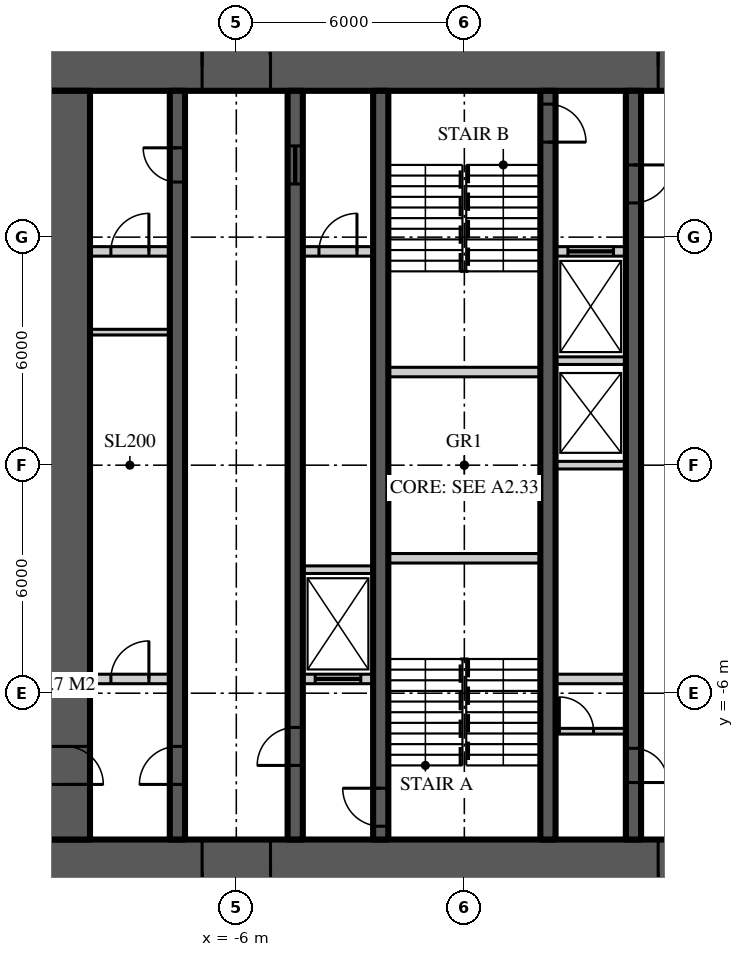
"""IFC4 building model, lengths in metres.
Left out: names, types, materials, properties, quantities, classifications, styles, units other than length and angle.
Written with IfcOpenShell. Run it as: python <this file> out.ifc"""

import sys

from ifc_helpers import new_model, si_unit, direction, frame, frame_2d, origin, place, context, subcontext, project, spatial, rectangle, extrude, element, fill, save


model = new_model("IFC4")
c1 = context("Model", 3, precision=1e-05, world=origin(), true_north=direction((0.0, 1.0)))
c2 = subcontext(c1, "Body", "Model", "MODEL_VIEW")
j1 = project(units=[si_unit("LENGTHUNIT", "METRE"), si_unit("PLANEANGLEUNIT", "RADIAN")], contexts=[c1])
p1 = place(None, origin())
s1 = spatial("IfcSite", under=j1, at=p1, CompositionType="ELEMENT")
p2 = place(p1, origin())
s2 = spatial("IfcBuilding", under=s1, at=p2, CompositionType="ELEMENT")
p3 = place(p2, frame((0.0, 0.0, 255.6)))
s3 = spatial("IfcBuildingStorey", under=s2, at=p3, CompositionType="ELEMENT", Elevation=255.6)
p4 = place(p3, frame((-11.15, 10.5, 0.0), z_axis=(0.0, 0.0, 1.0), x_axis=(1.0, 0.0, 0.0)))
e1 = element("IfcWall", 1, at=p4, inside=s3, PredefinedType="SHEAR", context=c2, shape_type="SweptSolid", body=[
    extrude(rectangle(XDim=22.3, YDim=1.3, at=frame_2d((11.15, 0.0))), origin(), (0.0, 0.0, 1.0), 3.9),
])
p5 = place(p4, frame((4.25, 0.0, 0.0)))
e2 = element("IfcOpeningElement", 2, at=p5, cuts=e1, PredefinedType="OPENING", context=c2, shape_type="SweptSolid", body=[
    extrude(rectangle(XDim=1.8, YDim=2.2, at=frame_2d((0.9, 1.1))), frame((0.0, 0.66, 0.0), z_axis=(0.0, -1.0, 0.0), x_axis=(1.0, 0.0, 0.0)), (0.0, 0.0, 1.0), 1.32),
])
p6 = place(p4, frame((16.25, 0.0, 0.0)))
e3 = element("IfcOpeningElement", 3, at=p6, cuts=e1, PredefinedType="OPENING", context=c2, shape_type="SweptSolid", body=[
    extrude(rectangle(XDim=1.8, YDim=2.2, at=frame_2d((0.9, 1.1))), frame((0.0, 0.66, 0.0), z_axis=(0.0, -1.0, 0.0), x_axis=(1.0, 0.0, 0.0)), (0.0, 0.0, 1.0), 1.32),
])
p7 = place(p3, frame((11.15, -10.5, 0.0), z_axis=(0.0, 0.0, 1.0), x_axis=(-1.0, 0.0, 0.0)))
e4 = element("IfcWall", 4, at=p7, inside=s3, PredefinedType="SHEAR", context=c2, shape_type="SweptSolid", body=[
    extrude(rectangle(XDim=22.3, YDim=1.3, at=frame_2d((11.15, 0.0))), origin(), (0.0, 0.0, 1.0), 3.9),
])
p8 = place(p7, frame((16.25, 0.0, 0.0)))
e5 = element("IfcOpeningElement", 5, at=p8, cuts=e4, PredefinedType="OPENING", context=c2, shape_type="SweptSolid", body=[
    extrude(rectangle(XDim=1.8, YDim=2.2, at=frame_2d((0.9, 1.1))), frame((0.0, 0.66, 0.0), z_axis=(0.0, -1.0, 0.0), x_axis=(1.0, 0.0, 0.0)), (0.0, 0.0, 1.0), 1.32),
])
p9 = place(p7, frame((4.25, 0.0, 0.0)))
e6 = element("IfcOpeningElement", 6, at=p9, cuts=e4, PredefinedType="OPENING", context=c2, shape_type="SweptSolid", body=[
    extrude(rectangle(XDim=1.8, YDim=2.2, at=frame_2d((0.9, 1.1))), frame((0.0, 0.66, 0.0), z_axis=(0.0, -1.0, 0.0), x_axis=(1.0, 0.0, 0.0)), (0.0, 0.0, 1.0), 1.32),
])
p10 = place(p3, frame((-10.5, 9.85, 0.0), z_axis=(0.0, 0.0, 1.0), x_axis=(0.0, -1.0, 0.0)))
e7 = element("IfcWall", 7, at=p10, inside=s3, PredefinedType="SHEAR", context=c2, shape_type="SweptSolid", body=[
    extrude(rectangle(XDim=19.7, YDim=1.3, at=frame_2d((9.85, 0.0))), origin(), (0.0, 0.0, 1.0), 3.9),
])
p11 = place(p10, frame((17.25, 0.0, 0.0)))
e8 = element("IfcOpeningElement", 8, at=p11, cuts=e7, PredefinedType="OPENING", context=c2, shape_type="SweptSolid", body=[
    extrude(rectangle(XDim=1.0, YDim=2.2, at=frame_2d((0.5, 1.1))), frame((0.0, 0.66, 0.0), z_axis=(0.0, -1.0, 0.0), x_axis=(1.0, 0.0, 0.0)), (0.0, 0.0, 1.0), 1.32),
])
p12 = place(p3, frame((-7.55, -9.85, 0.0), z_axis=(0.0, 0.0, 1.0), x_axis=(0.0, 1.0, 0.0)))
e9 = element("IfcWall", 9, at=p12, inside=s3, PredefinedType="SHEAR", context=c2, shape_type="SweptSolid", body=[
    extrude(rectangle(XDim=19.7, YDim=0.4, at=frame_2d((9.85, 0.0))), origin(), (0.0, 0.0, 1.0), 3.9),
])
p13 = place(p12, frame((1.45, 0.0, 0.0)))
e10 = element("IfcOpeningElement", 10, at=p13, cuts=e9, PredefinedType="OPENING", context=c2, shape_type="SweptSolid", body=[
    extrude(rectangle(XDim=1.0, YDim=2.2, at=frame_2d((0.5, 1.1))), frame((0.0, 0.21, 0.0), z_axis=(0.0, -1.0, 0.0), x_axis=(1.0, 0.0, 0.0)), (0.0, 0.0, 1.0), 0.42),
])
p14 = place(p12, frame((17.3, 0.0, 0.0)))
e11 = element("IfcOpeningElement", 11, at=p14, cuts=e9, PredefinedType="OPENING", context=c2, shape_type="SweptSolid", body=[
    extrude(rectangle(XDim=0.9, YDim=2.1, at=frame_2d((0.45, 1.05))), frame((0.0, 0.21, 0.0), z_axis=(0.0, -1.0, 0.0), x_axis=(1.0, 0.0, 0.0)), (0.0, 0.0, 1.0), 0.42),
])
p15 = place(p3, frame((-4.45, -9.85, 0.0), z_axis=(0.0, 0.0, 1.0), x_axis=(0.0, 1.0, 0.0)))
e12 = element("IfcWall", 12, at=p15, inside=s3, PredefinedType="SHEAR", context=c2, shape_type="SweptSolid", body=[
    extrude(rectangle(XDim=19.7, YDim=0.4, at=frame_2d((9.85, 0.0))), origin(), (0.0, 0.0, 1.0), 3.9),
])
p16 = place(p15, frame((1.95, 0.0, 0.0)))
e13 = element("IfcOpeningElement", 13, at=p16, cuts=e12, PredefinedType="OPENING", context=c2, shape_type="SweptSolid", body=[
    extrude(rectangle(XDim=1.0, YDim=2.2, at=frame_2d((0.5, 1.1))), frame((0.0, 0.21, 0.0), z_axis=(0.0, -1.0, 0.0), x_axis=(1.0, 0.0, 0.0)), (0.0, 0.0, 1.0), 0.42),
])
p17 = place(p15, frame((17.25, 0.0, 0.0)))
e14 = element("IfcOpeningElement", 14, at=p17, cuts=e12, PredefinedType="OPENING", context=c2, shape_type="SweptSolid", body=[
    extrude(rectangle(XDim=1.0, YDim=2.1, at=frame_2d((0.5, 1.05))), frame((0.0, 0.21, 0.0), z_axis=(0.0, -1.0, 0.0), x_axis=(1.0, 0.0, 0.0)), (0.0, 0.0, 1.0), 0.42),
])
p18 = place(p3, frame((4.45, 9.85, 0.0), z_axis=(0.0, 0.0, 1.0), x_axis=(0.0, -1.0, 0.0)))
e15 = element("IfcWall", 15, at=p18, inside=s3, PredefinedType="SHEAR", context=c2, shape_type="SweptSolid", body=[
    extrude(rectangle(XDim=19.7, YDim=0.4, at=frame_2d((9.85, 0.0))), origin(), (0.0, 0.0, 1.0), 3.9),
])
p19 = place(p18, frame((1.95, 0.0, 0.0)))
e16 = element("IfcOpeningElement", 16, at=p19, cuts=e15, PredefinedType="OPENING", context=c2, shape_type="SweptSolid", body=[
    extrude(rectangle(XDim=1.0, YDim=2.2, at=frame_2d((0.5, 1.1))), frame((0.0, 0.21, 0.0), z_axis=(0.0, -1.0, 0.0), x_axis=(1.0, 0.0, 0.0)), (0.0, 0.0, 1.0), 0.42),
])
p20 = place(p18, frame((17.3, 0.0, 0.0)))
e17 = element("IfcOpeningElement", 17, at=p20, cuts=e15, PredefinedType="OPENING", context=c2, shape_type="SweptSolid", body=[
    extrude(rectangle(XDim=0.9, YDim=2.1, at=frame_2d((0.45, 1.05))), frame((0.0, 0.21, 0.0), z_axis=(0.0, -1.0, 0.0), x_axis=(1.0, 0.0, 0.0)), (0.0, 0.0, 1.0), 0.42),
])
p21 = place(p3, frame((-2.2, -9.85, 0.0), z_axis=(0.0, 0.0, 1.0), x_axis=(0.0, 1.0, 0.0)))
e18 = element("IfcWall", 18, at=p21, inside=s3, PredefinedType="SHEAR", context=c2, shape_type="SweptSolid", body=[
    extrude(rectangle(XDim=19.7, YDim=0.4, at=frame_2d((9.85, 0.0))), origin(), (0.0, 0.0, 1.0), 3.9),
])
p22 = place(p21, frame((0.35, 0.0, 0.0)))
e19 = element("IfcOpeningElement", 19, at=p22, cuts=e18, PredefinedType="OPENING", context=c2, shape_type="SweptSolid", body=[
    extrude(rectangle(XDim=1.0, YDim=2.2, at=frame_2d((0.5, 1.1))), frame((0.0, 0.21, 0.0), z_axis=(0.0, -1.0, 0.0), x_axis=(1.0, 0.0, 0.0)), (0.0, 0.0, 1.0), 0.42),
])
p23 = place(p3, frame((2.2, 9.85, 0.0), z_axis=(0.0, 0.0, 1.0), x_axis=(0.0, -1.0, 0.0)))
e20 = element("IfcWall", 20, at=p23, inside=s3, PredefinedType="SHEAR", context=c2, shape_type="SweptSolid", body=[
    extrude(rectangle(XDim=19.7, YDim=0.4, at=frame_2d((9.85, 0.0))), origin(), (0.0, 0.0, 1.0), 3.9),
])
p24 = place(p23, frame((0.35, 0.0, 0.0)))
e21 = element("IfcOpeningElement", 21, at=p24, cuts=e20, PredefinedType="OPENING", context=c2, shape_type="SweptSolid", body=[
    extrude(rectangle(XDim=1.0, YDim=2.2, at=frame_2d((0.5, 1.1))), frame((0.0, 0.21, 0.0), z_axis=(0.0, -1.0, 0.0), x_axis=(1.0, 0.0, 0.0)), (0.0, 0.0, 1.0), 0.42),
])
p25 = place(p3, frame((-9.85, 5.625, 0.0), z_axis=(0.0, 0.0, 1.0), x_axis=(1.0, 0.0, 0.0)))
e22 = element("IfcWall", 22, at=p25, inside=s3, PredefinedType="SOLIDWALL", context=c2, shape_type="SweptSolid", body=[
    extrude(rectangle(XDim=2.1, YDim=0.25, at=frame_2d((1.05, 0.0))), origin(), (0.0, 0.0, 1.0), 3.7),
])
p26 = place(p25, frame((0.55, 0.0, 0.0)))
e23 = element("IfcOpeningElement", 23, at=p26, cuts=e22, PredefinedType="OPENING", context=c2, shape_type="SweptSolid", body=[
    extrude(rectangle(XDim=1.0, YDim=2.2, at=frame_2d((0.5, 1.1))), frame((0.0, 0.135, 0.0), z_axis=(0.0, -1.0, 0.0), x_axis=(1.0, 0.0, 0.0)), (0.0, 0.0, 1.0), 0.27),
])
p27 = place(p3, frame((-4.25, 5.625, 0.0), z_axis=(0.0, 0.0, 1.0), x_axis=(1.0, 0.0, 0.0)))
e24 = element("IfcWall", 24, at=p27, inside=s3, PredefinedType="SOLIDWALL", context=c2, shape_type="SweptSolid", body=[
    extrude(rectangle(XDim=1.85, YDim=0.25, at=frame_2d((0.925, 0.0))), origin(), (0.0, 0.0, 1.0), 3.7),
])
p28 = place(p27, frame((0.425, 0.0, 0.0)))
e25 = element("IfcOpeningElement", 25, at=p28, cuts=e24, PredefinedType="OPENING", context=c2, shape_type="SweptSolid", body=[
    extrude(rectangle(XDim=1.0, YDim=2.2, at=frame_2d((0.5, 1.1))), frame((0.0, 0.135, 0.0), z_axis=(0.0, -1.0, 0.0), x_axis=(1.0, 0.0, 0.0)), (0.0, 0.0, 1.0), 0.27),
])
p29 = place(p3, frame((2.4, 5.625, 0.0), z_axis=(0.0, 0.0, 1.0), x_axis=(1.0, 0.0, 0.0)))
e26 = element("IfcWall", 26, at=p29, inside=s3, PredefinedType="SOLIDWALL", context=c2, shape_type="SweptSolid", body=[
    extrude(rectangle(XDim=1.85, YDim=0.25, at=frame_2d((0.925, 0.0))), origin(), (0.0, 0.0, 1.0), 3.7),
])
p30 = place(p29, frame((0.325, 0.0, 0.0)))
e27 = element("IfcOpeningElement", 27, at=p30, cuts=e26, PredefinedType="OPENING", context=c2, shape_type="SweptSolid", body=[
    extrude(rectangle(XDim=1.2, YDim=2.2, at=frame_2d((0.6, 1.1))), frame((0.0, 0.135, 0.0), z_axis=(0.0, -1.0, 0.0), x_axis=(1.0, 0.0, 0.0)), (0.0, 0.0, 1.0), 0.27),
])
p31 = place(p3, frame((-9.85, -5.625, 0.0), z_axis=(0.0, 0.0, 1.0), x_axis=(1.0, 0.0, 0.0)))
e28 = element("IfcWall", 28, at=p31, inside=s3, PredefinedType="SOLIDWALL", context=c2, shape_type="SweptSolid", body=[
    extrude(rectangle(XDim=2.1, YDim=0.25, at=frame_2d((1.05, 0.0))), origin(), (0.0, 0.0, 1.0), 3.7),
])
p32 = place(p31, frame((0.55, 0.0, 0.0)))
e29 = element("IfcOpeningElement", 29, at=p32, cuts=e28, PredefinedType="OPENING", context=c2, shape_type="SweptSolid", body=[
    extrude(rectangle(XDim=1.0, YDim=2.2, at=frame_2d((0.5, 1.1))), frame((0.0, 0.135, 0.0), z_axis=(0.0, -1.0, 0.0), x_axis=(1.0, 0.0, 0.0)), (0.0, 0.0, 1.0), 0.27),
])
p33 = place(p3, frame((-4.25, -5.625, 0.0), z_axis=(0.0, 0.0, 1.0), x_axis=(1.0, 0.0, 0.0)))
e30 = element("IfcWall", 30, at=p33, inside=s3, PredefinedType="SOLIDWALL", context=c2, shape_type="SweptSolid", body=[
    extrude(rectangle(XDim=1.85, YDim=0.25, at=frame_2d((0.925, 0.0))), origin(), (0.0, 0.0, 1.0), 3.7),
])
p34 = place(p33, frame((0.325, 0.0, 0.0)))
e31 = element("IfcOpeningElement", 31, at=p34, cuts=e30, PredefinedType="OPENING", context=c2, shape_type="SweptSolid", body=[
    extrude(rectangle(XDim=1.2, YDim=2.2, at=frame_2d((0.6, 1.1))), frame((0.0, 0.135, 0.0), z_axis=(0.0, -1.0, 0.0), x_axis=(1.0, 0.0, 0.0)), (0.0, 0.0, 1.0), 0.27),
])
p35 = place(p3, frame((2.4, -5.625, 0.0), z_axis=(0.0, 0.0, 1.0), x_axis=(1.0, 0.0, 0.0)))
e32 = element("IfcWall", 32, at=p35, inside=s3, PredefinedType="SOLIDWALL", context=c2, shape_type="SweptSolid", body=[
    extrude(rectangle(XDim=1.85, YDim=0.25, at=frame_2d((0.925, 0.0))), origin(), (0.0, 0.0, 1.0), 3.7),
])
for number, where, z_axis, x_axis in (
    (33, (-2.0, -2.45, 0.0), (0.0, 0.0, 1.0), (1.0, 0.0, 0.0)),
    (34, (-2.0, 2.45, 0.0), (0.0, 0.0, 1.0), (1.0, 0.0, 0.0)),
):
    element("IfcWall", number, at=place(p3, frame(where, z_axis=z_axis, x_axis=x_axis)), inside=s3, PredefinedType="SOLIDWALL", context=c2, shape_type="SweptSolid", body=[
        extrude(rectangle(XDim=4.0, YDim=0.25, at=frame_2d((2.0, 0.0))), origin(), (0.0, 0.0, 1.0), 3.7),
    ])
for number, where, z_axis, x_axis in (
    (35, (-4.25, -2.75, 0.0), (0.0, 0.0, 1.0), (1.0, 0.0, 0.0)),
    (36, (2.4, 0.0, 0.0), (0.0, 0.0, 1.0), (1.0, 0.0, 0.0)),
    (37, (2.4, 2.75, 0.0), (0.0, 0.0, 1.0), (1.0, 0.0, 0.0)),
):
    element("IfcWall", number, at=place(p3, frame(where, z_axis=z_axis, x_axis=x_axis)), inside=s3, PredefinedType="SOLIDWALL", context=c2, shape_type="SweptSolid", body=[
        extrude(rectangle(XDim=1.85, YDim=0.2, at=frame_2d((0.925, 0.0))), origin(), (0.0, 0.0, 1.0), 3.7),
    ])
p36 = place(p3, frame((-9.85, 3.5, 0.0), z_axis=(0.0, 0.0, 1.0), x_axis=(1.0, 0.0, 0.0)))
e38 = element("IfcWall", 38, at=p36, inside=s3, PredefinedType="SOLIDWALL", context=c2, shape_type="SweptSolid", body=[
    extrude(rectangle(XDim=2.1, YDim=0.15, at=frame_2d((1.05, 0.0))), origin(), (0.0, 0.0, 1.0), 3.77),
])
p37 = place(p3, frame((2.4, -7.0, 0.0), z_axis=(0.0, 0.0, 1.0), x_axis=(1.0, 0.0, 0.0)))
e39 = element("IfcWall", 39, at=p37, inside=s3, PredefinedType="SOLIDWALL", context=c2, shape_type="SweptSolid", body=[
    extrude(rectangle(XDim=1.85, YDim=0.15, at=frame_2d((0.925, 0.0))), origin(), (0.0, 0.0, 1.0), 3.77),
])
p38 = place(p37, frame((0.1, 0.0, 0.0)))
e40 = element("IfcOpeningElement", 40, at=p38, cuts=e39, PredefinedType="OPENING", context=c2, shape_type="SweptSolid", body=[
    extrude(rectangle(XDim=0.9, YDim=2.1, at=frame_2d((0.45, 1.05))), frame((0.0, 0.085, 0.0), z_axis=(0.0, -1.0, 0.0), x_axis=(1.0, 0.0, 0.0)), (0.0, 0.0, 1.0), 0.17),
])
p39 = place(p5, origin())
e41 = element("IfcDoor", 41, at=p39, inside=s3, OperationType="DOUBLE_DOOR_DOUBLE_SWING", PredefinedType="DOOR", context=c2, shape_type="SweptSolid", body=[
    extrude(rectangle(XDim=1.8, YDim=2.2, at=frame_2d((0.9, 1.1))), frame((0.0, 0.025, 0.0), z_axis=(0.0, -1.0, 0.0), x_axis=(1.0, 0.0, 0.0)), (0.0, 0.0, 1.0), 0.05),
])
fill(e2, e41)
p40 = place(p8, origin())
e42 = element("IfcDoor", 42, at=p40, inside=s3, OperationType="DOUBLE_DOOR_DOUBLE_SWING", PredefinedType="DOOR", context=c2, shape_type="SweptSolid", body=[
    extrude(rectangle(XDim=1.8, YDim=2.2, at=frame_2d((0.9, 1.1))), frame((0.0, 0.025, 0.0), z_axis=(0.0, -1.0, 0.0), x_axis=(1.0, 0.0, 0.0)), (0.0, 0.0, 1.0), 0.05),
])
fill(e5, e42)
p41 = place(p6, origin())
e43 = element("IfcDoor", 43, at=p41, inside=s3, OperationType="DOUBLE_DOOR_DOUBLE_SWING", PredefinedType="DOOR", context=c2, shape_type="SweptSolid", body=[
    extrude(rectangle(XDim=1.8, YDim=2.2, at=frame_2d((0.9, 1.1))), frame((0.0, 0.025, 0.0), z_axis=(0.0, -1.0, 0.0), x_axis=(1.0, 0.0, 0.0)), (0.0, 0.0, 1.0), 0.05),
])
fill(e3, e43)
p42 = place(p9, origin())
e44 = element("IfcDoor", 44, at=p42, inside=s3, OperationType="DOUBLE_DOOR_DOUBLE_SWING", PredefinedType="DOOR", context=c2, shape_type="SweptSolid", body=[
    extrude(rectangle(XDim=1.8, YDim=2.2, at=frame_2d((0.9, 1.1))), frame((0.0, 0.025, 0.0), z_axis=(0.0, -1.0, 0.0), x_axis=(1.0, 0.0, 0.0)), (0.0, 0.0, 1.0), 0.05),
])
fill(e6, e44)
p43 = place(p13, origin())
e45 = element("IfcDoor", 45, at=p43, inside=s3, OperationType="SINGLE_SWING_LEFT", PredefinedType="DOOR", context=c2, shape_type="SweptSolid", body=[
    extrude(rectangle(XDim=1.0, YDim=2.2, at=frame_2d((0.5, 1.1))), frame((0.0, 0.025, 0.0), z_axis=(0.0, -1.0, 0.0), x_axis=(1.0, 0.0, 0.0)), (0.0, 0.0, 1.0), 0.05),
])
fill(e10, e45)
p44 = place(p11, origin())
e46 = element("IfcDoor", 46, at=p44, inside=s3, OperationType="SINGLE_SWING_RIGHT", PredefinedType="DOOR", context=c2, shape_type="SweptSolid", body=[
    extrude(rectangle(XDim=1.0, YDim=2.2, at=frame_2d((0.5, 1.1))), frame((0.0, 0.025, 0.0), z_axis=(0.0, -1.0, 0.0), x_axis=(1.0, 0.0, 0.0)), (0.0, 0.0, 1.0), 0.05),
])
fill(e8, e46)
p45 = place(p16, origin())
e47 = element("IfcDoor", 47, at=p45, inside=s3, OperationType="SINGLE_SWING_LEFT", PredefinedType="DOOR", context=c2, shape_type="SweptSolid", body=[
    extrude(rectangle(XDim=1.0, YDim=2.2, at=frame_2d((0.5, 1.1))), frame((0.0, 0.025, 0.0), z_axis=(0.0, -1.0, 0.0), x_axis=(1.0, 0.0, 0.0)), (0.0, 0.0, 1.0), 0.05),
])
fill(e13, e47)
p46 = place(p22, origin())
e48 = element("IfcDoor", 48, at=p46, inside=s3, OperationType="SINGLE_SWING_RIGHT", PredefinedType="DOOR", context=c2, shape_type="SweptSolid", body=[
    extrude(rectangle(XDim=1.0, YDim=2.2, at=frame_2d((0.5, 1.1))), frame((0.0, 0.025, 0.0), z_axis=(0.0, -1.0, 0.0), x_axis=(1.0, 0.0, 0.0)), (0.0, 0.0, 1.0), 0.05),
])
fill(e19, e48)
p47 = place(p19, origin())
e49 = element("IfcDoor", 49, at=p47, inside=s3, OperationType="SINGLE_SWING_LEFT", PredefinedType="DOOR", context=c2, shape_type="SweptSolid", body=[
    extrude(rectangle(XDim=1.0, YDim=2.2, at=frame_2d((0.5, 1.1))), frame((0.0, 0.025, 0.0), z_axis=(0.0, -1.0, 0.0), x_axis=(1.0, 0.0, 0.0)), (0.0, 0.0, 1.0), 0.05),
])
fill(e16, e49)
p48 = place(p24, origin())
e50 = element("IfcDoor", 50, at=p48, inside=s3, OperationType="SINGLE_SWING_RIGHT", PredefinedType="DOOR", context=c2, shape_type="SweptSolid", body=[
    extrude(rectangle(XDim=1.0, YDim=2.2, at=frame_2d((0.5, 1.1))), frame((0.0, 0.025, 0.0), z_axis=(0.0, -1.0, 0.0), x_axis=(1.0, 0.0, 0.0)), (0.0, 0.0, 1.0), 0.05),
])
fill(e21, e50)
p49 = place(p14, origin())
e51 = element("IfcDoor", 51, at=p49, inside=s3, OperationType="SINGLE_SWING_RIGHT", PredefinedType="DOOR", context=c2, shape_type="SweptSolid", body=[
    extrude(rectangle(XDim=0.9, YDim=2.1, at=frame_2d((0.45, 1.05))), frame((0.0, 0.025, 0.0), z_axis=(0.0, -1.0, 0.0), x_axis=(1.0, 0.0, 0.0)), (0.0, 0.0, 1.0), 0.05),
])
fill(e11, e51)
p50 = place(p17, origin())
e52 = element("IfcDoor", 52, at=p50, inside=s3, OperationType="SLIDING_TO_LEFT", PredefinedType="DOOR", context=c2, shape_type="SweptSolid", body=[
    extrude(rectangle(XDim=1.0, YDim=2.1, at=frame_2d((0.5, 1.05))), frame((0.0, 0.025, 0.0), z_axis=(0.0, -1.0, 0.0), x_axis=(1.0, 0.0, 0.0)), (0.0, 0.0, 1.0), 0.05),
])
fill(e14, e52)
p51 = place(p20, origin())
e53 = element("IfcDoor", 53, at=p51, inside=s3, OperationType="SINGLE_SWING_RIGHT", PredefinedType="DOOR", context=c2, shape_type="SweptSolid", body=[
    extrude(rectangle(XDim=0.9, YDim=2.1, at=frame_2d((0.45, 1.05))), frame((0.0, 0.025, 0.0), z_axis=(0.0, -1.0, 0.0), x_axis=(1.0, 0.0, 0.0)), (0.0, 0.0, 1.0), 0.05),
])
fill(e17, e53)
p52 = place(p34, origin())
e54 = element("IfcDoor", 54, at=p52, inside=s3, OperationType="SLIDING_TO_LEFT", PredefinedType="DOOR", context=c2, shape_type="SweptSolid", body=[
    extrude(rectangle(XDim=1.2, YDim=2.2, at=frame_2d((0.6, 1.1))), frame((0.0, 0.025, 0.0), z_axis=(0.0, -1.0, 0.0), x_axis=(1.0, 0.0, 0.0)), (0.0, 0.0, 1.0), 0.05),
])
fill(e31, e54)
p53 = place(p30, origin())
e55 = element("IfcDoor", 55, at=p53, inside=s3, OperationType="SLIDING_TO_LEFT", PredefinedType="DOOR", context=c2, shape_type="SweptSolid", body=[
    extrude(rectangle(XDim=1.2, YDim=2.2, at=frame_2d((0.6, 1.1))), frame((0.0, 0.025, 0.0), z_axis=(0.0, -1.0, 0.0), x_axis=(1.0, 0.0, 0.0)), (0.0, 0.0, 1.0), 0.05),
])
fill(e27, e55)
p54 = place(p26, origin())
e56 = element("IfcDoor", 56, at=p54, inside=s3, OperationType="SINGLE_SWING_RIGHT", PredefinedType="DOOR", context=c2, shape_type="SweptSolid", body=[
    extrude(rectangle(XDim=1.0, YDim=2.2, at=frame_2d((0.5, 1.1))), frame((0.0, 0.025, 0.0), z_axis=(0.0, -1.0, 0.0), x_axis=(1.0, 0.0, 0.0)), (0.0, 0.0, 1.0), 0.05),
])
fill(e23, e56)
p55 = place(p32, origin())
e57 = element("IfcDoor", 57, at=p55, inside=s3, OperationType="SINGLE_SWING_RIGHT", PredefinedType="DOOR", context=c2, shape_type="SweptSolid", body=[
    extrude(rectangle(XDim=1.0, YDim=2.2, at=frame_2d((0.5, 1.1))), frame((0.0, 0.025, 0.0), z_axis=(0.0, -1.0, 0.0), x_axis=(1.0, 0.0, 0.0)), (0.0, 0.0, 1.0), 0.05),
])
fill(e29, e57)
p56 = place(p28, origin())
e58 = element("IfcDoor", 58, at=p56, inside=s3, OperationType="SINGLE_SWING_RIGHT", PredefinedType="DOOR", context=c2, shape_type="SweptSolid", body=[
    extrude(rectangle(XDim=1.0, YDim=2.2, at=frame_2d((0.5, 1.1))), frame((0.0, 0.025, 0.0), z_axis=(0.0, -1.0, 0.0), x_axis=(1.0, 0.0, 0.0)), (0.0, 0.0, 1.0), 0.05),
])
fill(e25, e58)
p57 = place(p38, origin())
e59 = element("IfcDoor", 59, at=p57, inside=s3, OperationType="SINGLE_SWING_LEFT", PredefinedType="DOOR", context=c2, shape_type="SweptSolid", body=[
    extrude(rectangle(XDim=0.9, YDim=2.1, at=frame_2d((0.45, 1.05))), frame((0.0, 0.025, 0.0), z_axis=(0.0, -1.0, 0.0), x_axis=(1.0, 0.0, 0.0)), (0.0, 0.0, 1.0), 0.05),
])
fill(e40, e59)
save(model, sys.argv[1])
